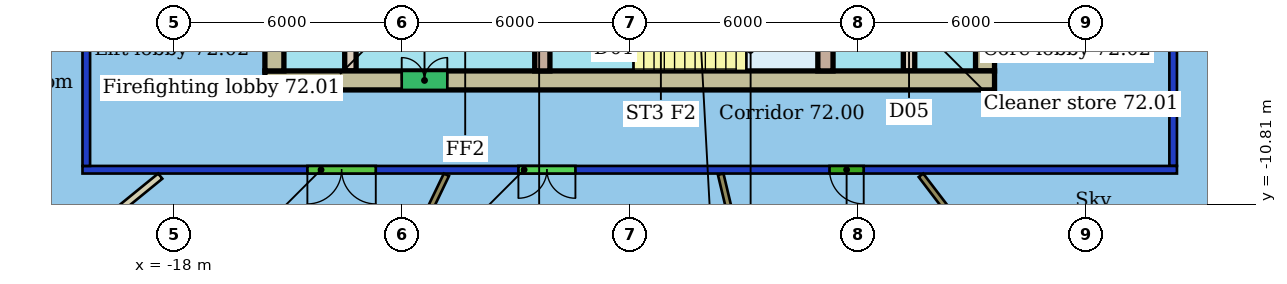
"""IFC4 building model, lengths in metres.
Left out: names, types, materials, properties, quantities, classifications, styles, units other than length and angle.
Written with IfcOpenShell. Run it as: python <this file> out.ifc"""

import sys

from ifc_helpers import new_model, si_unit, direction, frame, frame_2d, origin, place, context, subcontext, project, spatial, rectangle, extrude, element, fill, save


model = new_model("IFC4")
c1 = context("Model", 3, precision=1e-05, world=origin(), true_north=direction((0.0, 1.0)))
c2 = subcontext(c1, "Body", "Model", "MODEL_VIEW")
j1 = project(units=[si_unit("LENGTHUNIT", "METRE"), si_unit("PLANEANGLEUNIT", "RADIAN")], contexts=[c1])
p1 = place(None, origin())
s1 = spatial("IfcSite", under=j1, at=p1, CompositionType="ELEMENT")
p2 = place(p1, origin())
s2 = spatial("IfcBuilding", under=s1, at=p2, CompositionType="ELEMENT")
p3 = place(p2, frame((0.0, 0.0, 290.1)))
s3 = spatial("IfcBuildingStorey", under=s2, at=p3, CompositionType="ELEMENT", Elevation=290.1)
p4 = place(p3, frame((8.4, -9.9, 0.0), z_axis=(0.0, 0.0, 1.0), x_axis=(-1.0, 0.0, 0.0)))
e1 = element("IfcWall", 1, at=p4, inside=s3, PredefinedType="PARTITIONING", context=c2, shape_type="SweptSolid", body=[
    extrude(rectangle(XDim=28.8, YDim=0.2, at=frame_2d((14.4, 0.0))), origin(), (0.0, 0.0, 1.0), 3.1),
])
p5 = place(p4, frame((21.082, 0.0, 0.0)))
e2 = element("IfcOpeningElement", 2, at=p5, cuts=e1, PredefinedType="OPENING", context=c2, shape_type="SweptSolid", body=[
    extrude(rectangle(XDim=1.8, YDim=2.4, at=frame_2d((0.9, 1.2))), frame((0.0, 0.11, 0.0), z_axis=(0.0, -1.0, 0.0), x_axis=(1.0, 0.0, 0.0)), (0.0, 0.0, 1.0), 0.22),
])
p6 = place(p4, frame((15.829, 0.0, 0.0)))
e3 = element("IfcOpeningElement", 3, at=p6, cuts=e1, PredefinedType="OPENING", context=c2, shape_type="SweptSolid", body=[
    extrude(rectangle(XDim=1.5, YDim=2.1, at=frame_2d((0.75, 1.05))), frame((0.0, 0.11, 0.0), z_axis=(0.0, -1.0, 0.0), x_axis=(1.0, 0.0, 0.0)), (0.0, 0.0, 1.0), 0.22),
])
p7 = place(p4, frame((8.243, 0.0, 0.0)))
e4 = element("IfcOpeningElement", 4, at=p7, cuts=e1, PredefinedType="OPENING", context=c2, shape_type="SweptSolid", body=[
    extrude(rectangle(XDim=0.9, YDim=2.1, at=frame_2d((0.45, 1.05))), frame((0.0, 0.11, 0.0), z_axis=(0.0, -1.0, 0.0), x_axis=(1.0, 0.0, 0.0)), (0.0, 0.0, 1.0), 0.22),
])
p8 = place(p3, frame((-20.3, -9.8, 0.0), z_axis=(0.0, 0.0, 1.0), x_axis=(0.0, 1.0, 0.0)))
e5 = element("IfcWall", 5, at=p8, inside=s3, PredefinedType="PARTITIONING", context=c2, shape_type="SweptSolid", body=[
    extrude(rectangle(XDim=19.6, YDim=0.2, at=frame_2d((9.8, 0.0))), origin(), (0.0, 0.0, 1.0), 3.1),
])
p9 = place(p8, frame((8.396, 0.0, 0.0)))
e6 = element("IfcOpeningElement", 6, at=p9, cuts=e5, PredefinedType="OPENING", context=c2, shape_type="SweptSolid", body=[
    extrude(rectangle(XDim=1.5, YDim=2.1, at=frame_2d((0.75, 1.05))), frame((0.0, 0.11, 0.0), z_axis=(0.0, -1.0, 0.0), x_axis=(1.0, 0.0, 0.0)), (0.0, 0.0, 1.0), 0.22),
])
p10 = place(p8, frame((4.205, 0.0, 0.0)))
e7 = element("IfcOpeningElement", 7, at=p10, cuts=e5, PredefinedType="OPENING", context=c2, shape_type="SweptSolid", body=[
    extrude(rectangle(XDim=1.0, YDim=2.1, at=frame_2d((0.5, 1.05))), frame((0.0, 0.11, 0.0), z_axis=(0.0, -1.0, 0.0), x_axis=(1.0, 0.0, 0.0)), (0.0, 0.0, 1.0), 0.22),
])
p11 = place(p3, frame((8.3, 9.8, 0.0), z_axis=(0.0, 0.0, 1.0), x_axis=(0.0, -1.0, 0.0)))
e8 = element("IfcWall", 8, at=p11, inside=s3, PredefinedType="PARTITIONING", context=c2, shape_type="SweptSolid", body=[
    extrude(rectangle(XDim=19.6, YDim=0.2, at=frame_2d((9.8, 0.0))), origin(), (0.0, 0.0, 1.0), 3.1),
])
p12 = place(p11, frame((13.839, 0.0, 0.0)))
e9 = element("IfcOpeningElement", 9, at=p12, cuts=e8, PredefinedType="OPENING", context=c2, shape_type="SweptSolid", body=[
    extrude(rectangle(XDim=1.5, YDim=2.1, at=frame_2d((0.75, 1.05))), frame((0.0, 0.11, 0.0), z_axis=(0.0, -1.0, 0.0), x_axis=(1.0, 0.0, 0.0)), (0.0, 0.0, 1.0), 0.22),
])
p13 = place(p11, frame((8.55, 0.0, 0.0)))
e10 = element("IfcOpeningElement", 10, at=p13, cuts=e8, PredefinedType="OPENING", context=c2, shape_type="SweptSolid", body=[
    extrude(rectangle(XDim=0.9, YDim=2.1, at=frame_2d((0.45, 1.05))), frame((0.0, 0.11, 0.0), z_axis=(0.0, -1.0, 0.0), x_axis=(1.0, 0.0, 0.0)), (0.0, 0.0, 1.0), 0.22),
])
p14 = place(p11, frame((3.855, 0.0, 0.0)))
e11 = element("IfcOpeningElement", 11, at=p14, cuts=e8, PredefinedType="OPENING", context=c2, shape_type="SweptSolid", body=[
    extrude(rectangle(XDim=1.5, YDim=2.4, at=frame_2d((0.75, 1.2))), frame((0.0, 0.11, 0.0), z_axis=(0.0, -1.0, 0.0), x_axis=(1.0, 0.0, 0.0)), (0.0, 0.0, 1.0), 0.22),
])
p15 = place(p3, frame((-24.284, -14.9, 0.0), z_axis=(0.0, 0.0, 1.0), x_axis=(0.775191568624, 0.631726231792, 0.0)))
e12 = element("IfcWall", 12, at=p15, inside=s3, PredefinedType="PARTITIONING", context=c2, shape_type="SweptSolid", body=[
    extrude(rectangle(XDim=7.649, YDim=0.175, at=frame_2d((3.825, 0.0))), origin(), (0.0, 0.0, 1.0), 3.45),
])
p16 = place(p3, frame((-16.674, -22.198, 0.0), z_axis=(0.0, 0.0, 1.0), x_axis=(0.43334246097, 0.901229333478, 0.0)))
e13 = element("IfcWall", 13, at=p16, inside=s3, PredefinedType="PARTITIONING", context=c2, shape_type="SweptSolid", body=[
    extrude(rectangle(XDim=13.499, YDim=0.15, at=frame_2d((6.75, 0.0))), origin(), (0.0, 0.0, 1.0), 3.45),
])
p17 = place(p3, frame((-0.773, -21.874, 0.0), z_axis=(0.0, 0.0, 1.0), x_axis=(-0.232423713032, 0.972614629553, 0.0)))
e14 = element("IfcWall", 14, at=p17, inside=s3, PredefinedType="PARTITIONING", context=c2, shape_type="SweptSolid", body=[
    extrude(rectangle(XDim=12.19, YDim=0.15, at=frame_2d((6.095, 0.0))), origin(), (0.0, 0.0, 1.0), 3.45),
])
p18 = place(p3, frame((6.637, -16.564, 0.0), z_axis=(0.0, 0.0, 1.0), x_axis=(-0.606535643583, 0.795056295531, 0.0)))
e15 = element("IfcWall", 15, at=p18, inside=s3, PredefinedType="PARTITIONING", context=c2, shape_type="SweptSolid", body=[
    extrude(rectangle(XDim=8.199, YDim=0.15, at=frame_2d((4.1, 0.0))), origin(), (0.0, 0.0, 1.0), 3.45),
])
p19 = place(p3, frame((-15.6, -7.55, 0.0), z_axis=(0.0, 0.0, 1.0), x_axis=(1.0, 0.0, 0.0)))
e16 = element("IfcWall", 16, at=p19, inside=s3, PredefinedType="SHEAR", context=c2, shape_type="SweptSolid", body=[
    extrude(rectangle(XDim=19.2, YDim=0.5, at=frame_2d((9.6, 0.0))), origin(), (0.0, 0.0, 1.0), 3.3),
])
p20 = place(p19, frame((3.6, 0.0, 0.0)))
e17 = element("IfcOpeningElement", 17, at=p20, cuts=e16, PredefinedType="OPENING", context=c2, shape_type="SweptSolid", body=[
    extrude(rectangle(XDim=1.2, YDim=2.1, at=frame_2d((0.6, 1.05))), frame((0.0, 0.26, 0.0), z_axis=(0.0, -1.0, 0.0), x_axis=(1.0, 0.0, 0.0)), (0.0, 0.0, 1.0), 0.52),
])
p21 = place(p3, frame((-15.35, 7.3, 0.0), z_axis=(0.0, 0.0, 1.0), x_axis=(0.0, -1.0, 0.0)))
e18 = element("IfcWall", 18, at=p21, inside=s3, PredefinedType="SHEAR", context=c2, shape_type="SweptSolid", body=[
    extrude(rectangle(XDim=14.6, YDim=0.5, at=frame_2d((7.3, 0.0))), origin(), (0.0, 0.0, 1.0), 3.3),
])
p22 = place(p21, frame((10.6, 0.0, 0.0)))
e19 = element("IfcOpeningElement", 19, at=p22, cuts=e18, PredefinedType="OPENING", context=c2, shape_type="SweptSolid", body=[
    extrude(rectangle(XDim=1.2, YDim=2.1, at=frame_2d((0.6, 1.05))), frame((0.0, 0.26, 0.0), z_axis=(0.0, -1.0, 0.0), x_axis=(1.0, 0.0, 0.0)), (0.0, 0.0, 1.0), 0.52),
])
p23 = place(p21, frame((2.8, 0.0, 0.0)))
e20 = element("IfcOpeningElement", 20, at=p23, cuts=e18, PredefinedType="OPENING", context=c2, shape_type="SweptSolid", body=[
    extrude(rectangle(XDim=1.2, YDim=2.1, at=frame_2d((0.6, 1.05))), frame((0.0, 0.26, 0.0), z_axis=(0.0, -1.0, 0.0), x_axis=(1.0, 0.0, 0.0)), (0.0, 0.0, 1.0), 0.52),
])
p24 = place(p3, frame((3.35, -7.3, 0.0), z_axis=(0.0, 0.0, 1.0), x_axis=(0.0, 1.0, 0.0)))
e21 = element("IfcWall", 21, at=p24, inside=s3, PredefinedType="SHEAR", context=c2, shape_type="SweptSolid", body=[
    extrude(rectangle(XDim=14.6, YDim=0.5, at=frame_2d((7.3, 0.0))), origin(), (0.0, 0.0, 1.0), 3.3),
])
p25 = place(p24, frame((2.8, 0.0, 0.0)))
e22 = element("IfcOpeningElement", 22, at=p25, cuts=e21, PredefinedType="OPENING", context=c2, shape_type="SweptSolid", body=[
    extrude(rectangle(XDim=1.2, YDim=2.1, at=frame_2d((0.6, 1.05))), frame((0.0, 0.26, 0.0), z_axis=(0.0, -1.0, 0.0), x_axis=(1.0, 0.0, 0.0)), (0.0, 0.0, 1.0), 0.52),
])
p26 = place(p24, frame((10.6, 0.0, 0.0)))
e23 = element("IfcOpeningElement", 23, at=p26, cuts=e21, PredefinedType="OPENING", context=c2, shape_type="SweptSolid", body=[
    extrude(rectangle(XDim=1.2, YDim=2.1, at=frame_2d((0.6, 1.05))), frame((0.0, 0.26, 0.0), z_axis=(0.0, -1.0, 0.0), x_axis=(1.0, 0.0, 0.0)), (0.0, 0.0, 1.0), 0.52),
])
p27 = place(p3, frame((-13.35, 7.3, 0.0), z_axis=(0.0, 0.0, 1.0), x_axis=(0.0, -1.0, 0.0)))
e24 = element("IfcWall", 24, at=p27, inside=s3, PredefinedType="SHEAR", context=c2, shape_type="SweptSolid", body=[
    extrude(rectangle(XDim=14.6, YDim=0.3, at=frame_2d((7.3, 0.0))), origin(), (0.0, 0.0, 1.0), 3.3),
])
p28 = place(p27, frame((6.55, 0.0, 0.0)))
e25 = element("IfcOpeningElement", 25, at=p28, cuts=e24, PredefinedType="OPENING", context=c2, shape_type="SweptSolid", body=[
    extrude(rectangle(XDim=1.5, YDim=2.1, at=frame_2d((0.75, 1.05))), frame((0.0, 0.16, 0.0), z_axis=(0.0, -1.0, 0.0), x_axis=(1.0, 0.0, 0.0)), (0.0, 0.0, 1.0), 0.32),
])
p29 = place(p3, frame((1.35, -7.3, 0.0), z_axis=(0.0, 0.0, 1.0), x_axis=(0.0, 1.0, 0.0)))
e26 = element("IfcWall", 26, at=p29, inside=s3, PredefinedType="SHEAR", context=c2, shape_type="SweptSolid", body=[
    extrude(rectangle(XDim=14.6, YDim=0.3, at=frame_2d((7.3, 0.0))), origin(), (0.0, 0.0, 1.0), 3.3),
])
p30 = place(p29, frame((1.21, 0.0, 0.0)))
e27 = element("IfcOpeningElement", 27, at=p30, cuts=e26, PredefinedType="OPENING", context=c2, shape_type="SweptSolid", body=[
    extrude(rectangle(XDim=1.0, YDim=2.1, at=frame_2d((0.5, 1.05))), frame((0.0, 0.16, 0.0), z_axis=(0.0, -1.0, 0.0), x_axis=(1.0, 0.0, 0.0)), (0.0, 0.0, 1.0), 0.32),
])
p31 = place(p29, frame((6.55, 0.0, 0.0)))
e28 = element("IfcOpeningElement", 28, at=p31, cuts=e26, PredefinedType="OPENING", context=c2, shape_type="SweptSolid", body=[
    extrude(rectangle(XDim=1.5, YDim=2.1, at=frame_2d((0.75, 1.05))), frame((0.0, 0.16, 0.0), z_axis=(0.0, -1.0, 0.0), x_axis=(1.0, 0.0, 0.0)), (0.0, 0.0, 1.0), 0.32),
])
p32 = place(p3, frame((-8.3, -3.88, 0.0), z_axis=(0.0, 0.0, 1.0), x_axis=(0.0, -1.0, 0.0)))
e29 = element("IfcWall", 29, at=p32, inside=s3, PredefinedType="SHEAR", context=c2, shape_type="SweptSolid", body=[
    extrude(rectangle(XDim=3.42, YDim=0.4, at=frame_2d((1.71, 0.0))), origin(), (0.0, 0.0, 1.0), 3.3),
])
p33 = place(p32, frame((1.11, 0.0, 0.0)))
e30 = element("IfcOpeningElement", 30, at=p33, cuts=e29, PredefinedType="OPENING", context=c2, shape_type="SweptSolid", body=[
    extrude(rectangle(XDim=1.2, YDim=2.1, at=frame_2d((0.6, 1.05))), frame((0.0, 0.21, 0.0), z_axis=(0.0, -1.0, 0.0), x_axis=(1.0, 0.0, 0.0)), (0.0, 0.0, 1.0), 0.42),
])
p34 = place(p3, frame((-0.85, -3.88, 0.0), z_axis=(0.0, 0.0, 1.0), x_axis=(0.0, -1.0, 0.0)))
e31 = element("IfcWall", 31, at=p34, inside=s3, PredefinedType="SHEAR", context=c2, shape_type="SweptSolid", body=[
    extrude(rectangle(XDim=3.42, YDim=0.4, at=frame_2d((1.71, 0.0))), origin(), (0.0, 0.0, 1.0), 3.3),
])
p35 = place(p5, origin())
e32 = element("IfcDoor", 32, at=p35, inside=s3, OperationType="DOUBLE_DOOR_SINGLE_SWING", PredefinedType="DOOR", context=c2, shape_type="SweptSolid", body=[
    extrude(rectangle(XDim=1.8, YDim=2.4, at=frame_2d((0.9, 1.2))), frame((0.0, 0.025, 0.0), z_axis=(0.0, -1.0, 0.0), x_axis=(1.0, 0.0, 0.0)), (0.0, 0.0, 1.0), 0.05),
])
fill(e2, e32)
p36 = place(p6, origin())
e33 = element("IfcDoor", 33, at=p36, inside=s3, OperationType="DOUBLE_DOOR_SINGLE_SWING", PredefinedType="DOOR", context=c2, shape_type="SweptSolid", body=[
    extrude(rectangle(XDim=1.5, YDim=2.1, at=frame_2d((0.75, 1.05))), frame((0.0, 0.025, 0.0), z_axis=(0.0, -1.0, 0.0), x_axis=(1.0, 0.0, 0.0)), (0.0, 0.0, 1.0), 0.05),
])
fill(e3, e33)
p37 = place(p7, origin())
e34 = element("IfcDoor", 34, at=p37, inside=s3, OperationType="SINGLE_SWING_LEFT", PredefinedType="DOOR", context=c2, shape_type="SweptSolid", body=[
    extrude(rectangle(XDim=0.9, YDim=2.1, at=frame_2d((0.45, 1.05))), frame((0.0, 0.025, 0.0), z_axis=(0.0, -1.0, 0.0), x_axis=(1.0, 0.0, 0.0)), (0.0, 0.0, 1.0), 0.05),
])
fill(e4, e34)
p38 = place(p20, origin())
e35 = element("IfcDoor", 35, at=p38, inside=s3, OperationType="DOUBLE_DOOR_SINGLE_SWING", PredefinedType="NOTDEFINED", context=c2, shape_type="SweptSolid", body=[
    extrude(rectangle(XDim=1.2, YDim=2.1, at=frame_2d((0.6, 1.05))), frame((0.0, 0.025, 0.0), z_axis=(0.0, -1.0, 0.0), x_axis=(1.0, 0.0, 0.0)), (0.0, 0.0, 1.0), 0.05),
])
fill(e17, e35)
save(model, sys.argv[1])
